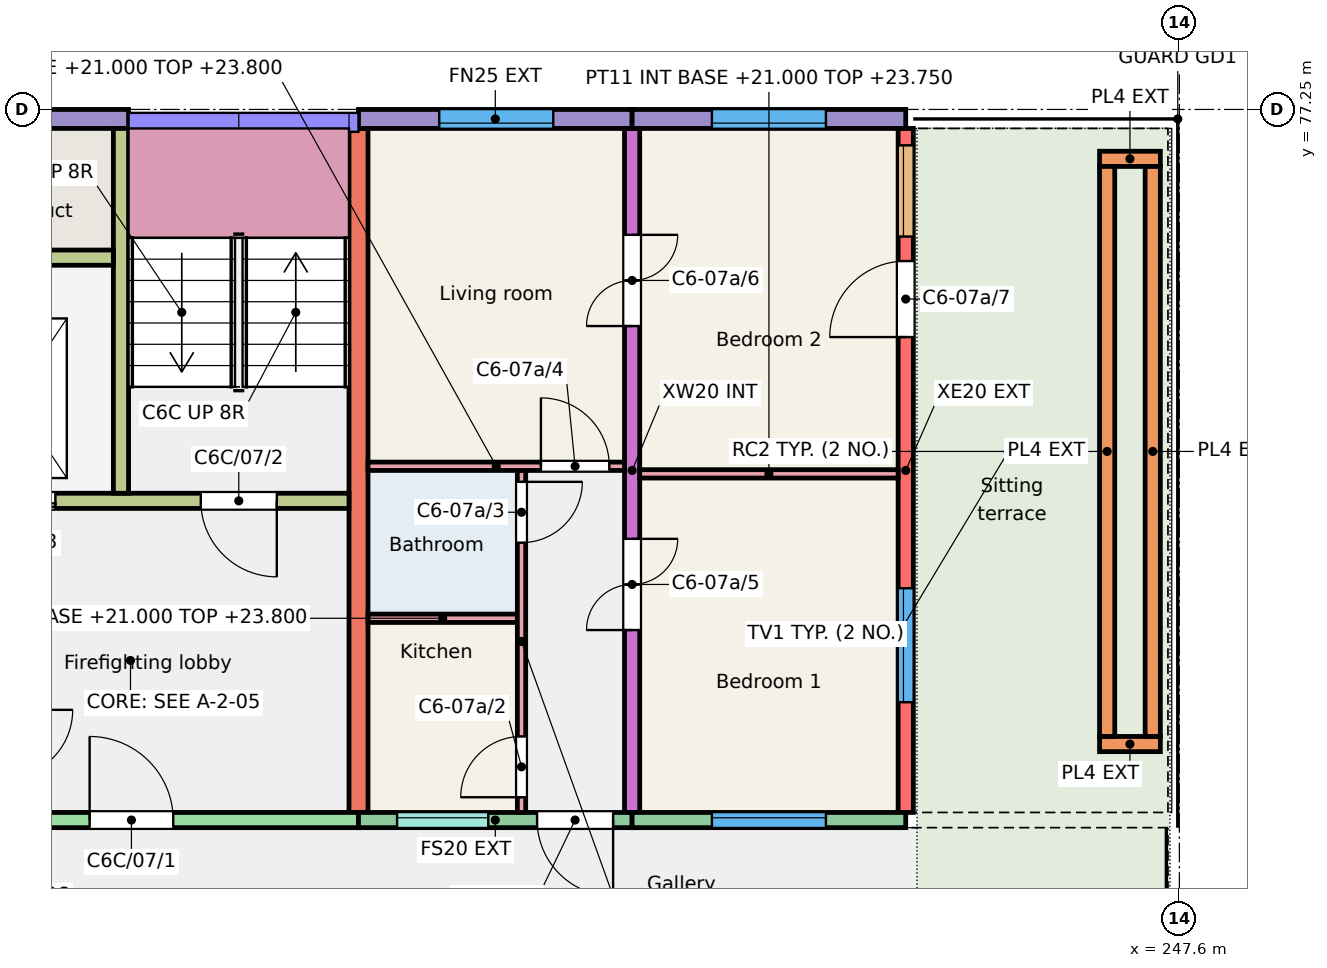
"""IFC4 building model, lengths in metres.
Left out: names, types, materials, properties, quantities, classifications, styles, units other than length and angle.
Written with IfcOpenShell. Run it as: python <this file> out.ifc"""

import sys

from ifc_helpers import new_model, si_unit, direction, frame, frame_2d, origin, place, context, subcontext, project, spatial, rectangle, extrude, element, fill, save


model = new_model("IFC4")
c1 = context("Model", 3, precision=1e-05, world=origin(), true_north=direction((0.0, 1.0)))
c2 = subcontext(c1, "Body", "Model", "MODEL_VIEW")
j1 = project(units=[si_unit("LENGTHUNIT", "METRE"), si_unit("PLANEANGLEUNIT", "RADIAN")], contexts=[c1])
p1 = place(None, origin())
s1 = spatial("IfcSite", under=j1, at=p1, CompositionType="ELEMENT")
p2 = place(p1, origin())
s2 = spatial("IfcBuilding", under=s1, at=p2, CompositionType="ELEMENT")
p3 = place(p2, frame((0.0, 0.0, 21.0)))
s3 = spatial("IfcBuildingStorey", under=s2, at=p3, CompositionType="ELEMENT", Elevation=21.0)
p4 = place(p3, frame((236.8, 68.0, 0.0), z_axis=(0.0, 0.0, 1.0), x_axis=(0.0, 1.0, 0.0)))
e1 = element("IfcWall", 1, at=p4, inside=s3, PredefinedType="SHEAR", context=c2, shape_type="SweptSolid", body=[
    extrude(rectangle(XDim=9.0, YDim=0.25, at=frame_2d((4.5, 0.0))), origin(), (0.0, 0.0, 1.0), 3.0),
])
p5 = place(p3, frame((240.4, 68.0, 0.0), z_axis=(0.0, 0.0, 1.0), x_axis=(0.0, 1.0, 0.0)))
e2 = element("IfcWall", 2, at=p5, inside=s3, PredefinedType="SHEAR", context=c2, shape_type="SweptSolid", body=[
    extrude(rectangle(XDim=9.0, YDim=0.2, at=frame_2d((4.5, 0.0))), origin(), (0.0, 0.0, 1.0), 3.0),
])
p6 = place(p5, frame((2.4, 0.0, 0.0)))
e3 = element("IfcOpeningElement", 3, at=p6, cuts=e2, PredefinedType="OPENING", context=c2, shape_type="SweptSolid", body=[
    extrude(rectangle(XDim=1.2, YDim=2.1, at=frame_2d((0.6, 1.05))), frame((0.0, 0.11, 0.0), z_axis=(0.0, -1.0, 0.0), x_axis=(1.0, 0.0, 0.0)), (0.0, 0.0, 1.0), 0.22),
])
p7 = place(p5, frame((6.4, 0.0, 0.0)))
e4 = element("IfcOpeningElement", 4, at=p7, cuts=e2, PredefinedType="OPENING", context=c2, shape_type="SweptSolid", body=[
    extrude(rectangle(XDim=1.2, YDim=2.1, at=frame_2d((0.6, 1.05))), frame((0.0, 0.11, 0.0), z_axis=(0.0, -1.0, 0.0), x_axis=(1.0, 0.0, 0.0)), (0.0, 0.0, 1.0), 0.22),
])
p8 = place(p3, frame((244.0, 68.0, 0.0), z_axis=(0.0, 0.0, 1.0), x_axis=(0.0, 1.0, 0.0)))
e5 = element("IfcWall", 5, at=p8, inside=s3, PredefinedType="SHEAR", context=c2, shape_type="SweptSolid", body=[
    extrude(rectangle(XDim=9.0, YDim=0.2, at=frame_2d((4.5, 0.0))), origin(), (0.0, 0.0, 1.0), 3.0),
])
p9 = place(p8, frame((1.45, 0.0, 0.9)))
e6 = element("IfcOpeningElement", 6, at=p9, cuts=e5, PredefinedType="OPENING", context=c2, shape_type="SweptSolid", body=[
    extrude(rectangle(XDim=1.5, YDim=1.5, at=frame_2d((0.75, 0.75))), frame((0.0, 0.11, 0.0), z_axis=(0.0, -1.0, 0.0), x_axis=(1.0, 0.0, 0.0)), (0.0, 0.0, 1.0), 0.22),
])
p10 = place(p8, frame((7.577, 0.0, 0.9)))
e7 = element("IfcOpeningElement", 7, at=p10, cuts=e5, PredefinedType="OPENING", context=c2, shape_type="SweptSolid", body=[
    extrude(rectangle(XDim=1.2, YDim=1.5, at=frame_2d((0.6, 0.75))), frame((0.0, 0.11, 0.0), z_axis=(0.0, -1.0, 0.0), x_axis=(1.0, 0.0, 0.0)), (0.0, 0.0, 1.0), 0.22),
])
p11 = place(p8, frame((6.255, 0.0, 0.0)))
e8 = element("IfcOpeningElement", 8, at=p11, cuts=e5, PredefinedType="OPENING", context=c2, shape_type="SweptSolid", body=[
    extrude(rectangle(XDim=1.0, YDim=2.1, at=frame_2d((0.5, 1.05))), frame((0.0, 0.11, 0.0), z_axis=(0.0, -1.0, 0.0), x_axis=(1.0, 0.0, 0.0)), (0.0, 0.0, 1.0), 0.22),
])
p12 = place(p3, frame((230.8, 77.125, 0.0), z_axis=(0.0, 0.0, 1.0), x_axis=(1.0, 0.0, 0.0)))
e9 = element("IfcWall", 9, at=p12, inside=s3, PredefinedType="SOLIDWALL", context=c2, shape_type="SweptSolid", body=[
    extrude(rectangle(XDim=2.975, YDim=0.25, at=frame_2d((1.487, 0.0))), origin(), (0.0, 0.0, 1.0), 3.0),
])
p13 = place(p3, frame((230.95, 67.9, 0.0), z_axis=(0.0, 0.0, 1.0), x_axis=(1.0, 0.0, 0.0)))
e10 = element("IfcWall", 10, at=p13, inside=s3, PredefinedType="SHEAR", context=c2, shape_type="SweptSolid", body=[
    extrude(rectangle(XDim=5.85, YDim=0.2, at=frame_2d((2.925, 0.0))), origin(), (0.0, 0.0, 1.0), 3.0),
])
p14 = place(p13, frame((2.312, 0.0, 0.0)))
e11 = element("IfcOpeningElement", 11, at=p14, cuts=e10, PredefinedType="OPENING", context=c2, shape_type="SweptSolid", body=[
    extrude(rectangle(XDim=1.1, YDim=2.1, at=frame_2d((0.55, 1.05))), frame((0.0, 0.11, 0.0), z_axis=(0.0, -1.0, 0.0), x_axis=(1.0, 0.0, 0.0)), (0.0, 0.0, 1.0), 0.22),
])
p15 = place(p3, frame((230.95, 72.1, 0.0), z_axis=(0.0, 0.0, 1.0), x_axis=(1.0, 0.0, 0.0)))
e12 = element("IfcWall", 12, at=p15, inside=s3, PredefinedType="SHEAR", context=c2, shape_type="SweptSolid", body=[
    extrude(rectangle(XDim=5.725, YDim=0.2, at=frame_2d((2.863, 0.0))), origin(), (0.0, 0.0, 1.0), 3.0),
])
p16 = place(p15, frame((3.775, 0.0, 0.0)))
e13 = element("IfcOpeningElement", 13, at=p16, cuts=e12, PredefinedType="OPENING", context=c2, shape_type="SweptSolid", body=[
    extrude(rectangle(XDim=1.0, YDim=2.1, at=frame_2d((0.5, 1.05))), frame((0.0, 0.11, 0.0), z_axis=(0.0, -1.0, 0.0), x_axis=(1.0, 0.0, 0.0)), (0.0, 0.0, 1.0), 0.22),
])
p17 = place(p15, frame((0.762, 0.0, 0.0)))
e14 = element("IfcOpeningElement", 14, at=p17, cuts=e12, PredefinedType="OPENING", context=c2, shape_type="SweptSolid", body=[
    extrude(rectangle(XDim=1.1, YDim=2.1, at=frame_2d((0.55, 1.05))), frame((0.0, 0.11, 0.0), z_axis=(0.0, -1.0, 0.0), x_axis=(1.0, 0.0, 0.0)), (0.0, 0.0, 1.0), 0.22),
])
p18 = place(p3, frame((233.675, 72.2, 0.0), z_axis=(0.0, 0.0, 1.0), x_axis=(0.0, 1.0, 0.0)))
e15 = element("IfcWall", 15, at=p18, inside=s3, PredefinedType="SHEAR", context=c2, shape_type="SweptSolid", body=[
    extrude(rectangle(XDim=4.8, YDim=0.2, at=frame_2d((2.4, 0.0))), origin(), (0.0, 0.0, 1.0), 3.0),
])
p19 = place(p3, frame((230.95, 75.3, 0.0), z_axis=(0.0, 0.0, 1.0), x_axis=(1.0, 0.0, 0.0)))
e16 = element("IfcWall", 16, at=p19, inside=s3, PredefinedType="SHEAR", context=c2, shape_type="SweptSolid", body=[
    extrude(rectangle(XDim=2.625, YDim=0.2, at=frame_2d((1.312, 0.0))), origin(), (0.0, 0.0, 1.0), 3.0),
])
p20 = place(p3, frame((236.8, 77.125, 0.0), z_axis=(0.0, 0.0, 1.0), x_axis=(1.0, 0.0, 0.0)))
e17 = element("IfcWall", 17, at=p20, inside=s3, PredefinedType="SOLIDWALL", context=c2, shape_type="SweptSolid", body=[
    extrude(rectangle(XDim=3.6, YDim=0.25, at=frame_2d((1.8, 0.0))), origin(), (0.0, 0.0, 1.0), 3.0),
])
p21 = place(p20, frame((1.062, 0.0, 0.9)))
e18 = element("IfcOpeningElement", 18, at=p21, cuts=e17, PredefinedType="OPENING", context=c2, shape_type="SweptSolid", body=[
    extrude(rectangle(XDim=1.5, YDim=1.5, at=frame_2d((0.75, 0.75))), frame((0.0, 0.135, 0.0), z_axis=(0.0, -1.0, 0.0), x_axis=(1.0, 0.0, 0.0)), (0.0, 0.0, 1.0), 0.27),
])
p22 = place(p3, frame((236.8, 67.9, 0.0), z_axis=(0.0, 0.0, 1.0), x_axis=(1.0, 0.0, 0.0)))
e19 = element("IfcWall", 19, at=p22, inside=s3, PredefinedType="SOLIDWALL", context=c2, shape_type="SweptSolid", body=[
    extrude(rectangle(XDim=3.6, YDim=0.2, at=frame_2d((1.8, 0.0))), origin(), (0.0, 0.0, 1.0), 3.0),
])
p23 = place(p22, frame((0.508, 0.0, 1.1)))
e20 = element("IfcOpeningElement", 20, at=p23, cuts=e19, PredefinedType="OPENING", context=c2, shape_type="SweptSolid", body=[
    extrude(rectangle(XDim=1.2, YDim=1.3, at=frame_2d((0.6, 0.65))), frame((0.0, 0.11, 0.0), z_axis=(0.0, -1.0, 0.0), x_axis=(1.0, 0.0, 0.0)), (0.0, 0.0, 1.0), 0.22),
])
p24 = place(p22, frame((2.35, 0.0, 0.0)))
e21 = element("IfcOpeningElement", 21, at=p24, cuts=e19, PredefinedType="OPENING", context=c2, shape_type="SweptSolid", body=[
    extrude(rectangle(XDim=1.0, YDim=2.1, at=frame_2d((0.5, 1.05))), frame((0.0, 0.11, 0.0), z_axis=(0.0, -1.0, 0.0), x_axis=(1.0, 0.0, 0.0)), (0.0, 0.0, 1.0), 0.22),
])
p25 = place(p3, frame((240.4, 77.125, 0.0), z_axis=(0.0, 0.0, 1.0), x_axis=(1.0, 0.0, 0.0)))
e22 = element("IfcWall", 22, at=p25, inside=s3, PredefinedType="SOLIDWALL", context=c2, shape_type="SweptSolid", body=[
    extrude(rectangle(XDim=3.6, YDim=0.25, at=frame_2d((1.8, 0.0))), origin(), (0.0, 0.0, 1.0), 3.0),
])
p26 = place(p25, frame((1.05, 0.0, 0.9)))
e23 = element("IfcOpeningElement", 23, at=p26, cuts=e22, PredefinedType="OPENING", context=c2, shape_type="SweptSolid", body=[
    extrude(rectangle(XDim=1.5, YDim=1.5, at=frame_2d((0.75, 0.75))), frame((0.0, 0.135, 0.0), z_axis=(0.0, -1.0, 0.0), x_axis=(1.0, 0.0, 0.0)), (0.0, 0.0, 1.0), 0.27),
])
p27 = place(p3, frame((240.4, 67.9, 0.0), z_axis=(0.0, 0.0, 1.0), x_axis=(1.0, 0.0, 0.0)))
e24 = element("IfcWall", 24, at=p27, inside=s3, PredefinedType="SOLIDWALL", context=c2, shape_type="SweptSolid", body=[
    extrude(rectangle(XDim=3.6, YDim=0.2, at=frame_2d((1.8, 0.0))), origin(), (0.0, 0.0, 1.0), 3.0),
])
p28 = place(p27, frame((1.05, 0.0, 0.9)))
e25 = element("IfcOpeningElement", 25, at=p28, cuts=e24, PredefinedType="OPENING", context=c2, shape_type="SweptSolid", body=[
    extrude(rectangle(XDim=1.5, YDim=1.5, at=frame_2d((0.75, 0.75))), frame((0.0, 0.11, 0.0), z_axis=(0.0, -1.0, 0.0), x_axis=(1.0, 0.0, 0.0)), (0.0, 0.0, 1.0), 0.22),
])
for number, where, z_axis, x_axis in (
    (26, (246.55, 68.9, 0.01), (0.0, 0.0, 1.0), (1.0, 0.0, 0.0)),
    (27, (246.55, 76.6, 0.01), (0.0, 0.0, 1.0), (1.0, 0.0, 0.0)),
):
    element("IfcWall", number, at=place(p3, frame(where, z_axis=z_axis, x_axis=x_axis)), inside=s3, PredefinedType="SOLIDWALL", context=c2, shape_type="SweptSolid", body=[
        extrude(rectangle(XDim=0.8, YDim=0.2, at=frame_2d((0.4, 0.0))), origin(), (0.0, 0.0, 1.0), 0.45),
    ])
for number, where, z_axis, x_axis in (
    (28, (246.65, 69.0, 0.01), (0.0, 0.0, 1.0), (0.0, 1.0, 0.0)),
    (29, (247.25, 69.0, 0.01), (0.0, 0.0, 1.0), (0.0, 1.0, 0.0)),
):
    element("IfcWall", number, at=place(p3, frame(where, z_axis=z_axis, x_axis=x_axis)), inside=s3, PredefinedType="SOLIDWALL", context=c2, shape_type="SweptSolid", body=[
        extrude(rectangle(XDim=7.5, YDim=0.2, at=frame_2d((3.75, 0.0))), origin(), (0.0, 0.0, 1.0), 0.45),
    ])
p29 = place(p3, frame((236.925, 70.555, 0.0), z_axis=(0.0, 0.0, 1.0), x_axis=(1.0, 0.0, 0.0)))
e30 = element("IfcWall", 30, at=p29, inside=s3, PredefinedType="PARTITIONING", context=c2, shape_type="SweptSolid", body=[
    extrude(rectangle(XDim=1.965, YDim=0.11, at=frame_2d((0.982, 0.0))), origin(), (0.0, 0.0, 1.0), 2.8),
])
p30 = place(p3, frame((238.945, 68.0, 0.0), z_axis=(0.0, 0.0, 1.0), x_axis=(0.0, 1.0, 0.0)))
e31 = element("IfcWall", 31, at=p30, inside=s3, PredefinedType="PARTITIONING", context=c2, shape_type="SweptSolid", body=[
    extrude(rectangle(XDim=4.5, YDim=0.11, at=frame_2d((2.25, 0.0))), origin(), (0.0, 0.0, 1.0), 2.8),
])
p31 = place(p30, frame((0.2, 0.0, 0.0)))
e32 = element("IfcOpeningElement", 32, at=p31, cuts=e31, PredefinedType="OPENING", context=c2, shape_type="SweptSolid", body=[
    extrude(rectangle(XDim=0.8, YDim=2.1, at=frame_2d((0.4, 1.05))), frame((0.0, 0.065, 0.0), z_axis=(0.0, -1.0, 0.0), x_axis=(1.0, 0.0, 0.0)), (0.0, 0.0, 1.0), 0.13),
])
p32 = place(p30, frame((3.55, 0.0, 0.0)))
e33 = element("IfcOpeningElement", 33, at=p32, cuts=e31, PredefinedType="OPENING", context=c2, shape_type="SweptSolid", body=[
    extrude(rectangle(XDim=0.8, YDim=2.1, at=frame_2d((0.4, 1.05))), frame((0.0, 0.065, 0.0), z_axis=(0.0, -1.0, 0.0), x_axis=(1.0, 0.0, 0.0)), (0.0, 0.0, 1.0), 0.13),
])
p33 = place(p3, frame((236.925, 72.555, 0.0), z_axis=(0.0, 0.0, 1.0), x_axis=(1.0, 0.0, 0.0)))
e34 = element("IfcWall", 34, at=p33, inside=s3, PredefinedType="PARTITIONING", context=c2, shape_type="SweptSolid", body=[
    extrude(rectangle(XDim=3.375, YDim=0.11, at=frame_2d((1.688, 0.0))), origin(), (0.0, 0.0, 1.0), 2.8),
])
p34 = place(p33, frame((2.275, 0.0, 0.0)))
e35 = element("IfcOpeningElement", 35, at=p34, cuts=e34, PredefinedType="OPENING", context=c2, shape_type="SweptSolid", body=[
    extrude(rectangle(XDim=0.9, YDim=2.1, at=frame_2d((0.45, 1.05))), frame((0.0, 0.065, 0.0), z_axis=(0.0, -1.0, 0.0), x_axis=(1.0, 0.0, 0.0)), (0.0, 0.0, 1.0), 0.13),
])
p35 = place(p3, frame((240.5, 72.455, 0.0), z_axis=(0.0, 0.0, 1.0), x_axis=(1.0, 0.0, 0.0)))
e36 = element("IfcWall", 36, at=p35, inside=s3, PredefinedType="PARTITIONING", context=c2, shape_type="SweptSolid", body=[
    extrude(rectangle(XDim=3.4, YDim=0.11, at=frame_2d((1.7, 0.0))), origin(), (0.0, 0.0, 1.0), 2.75),
])
p36 = place(p28, origin())
e37 = element("IfcWindow", 37, at=p36, inside=s3, PartitioningType="SINGLE_PANEL", PredefinedType="WINDOW", context=c2, shape_type="SweptSolid", body=[
    extrude(rectangle(XDim=1.5, YDim=1.5, at=frame_2d((0.75, 0.75))), frame((0.0, 0.06, 0.0), z_axis=(0.0, -1.0, 0.0), x_axis=(1.0, 0.0, 0.0)), (0.0, 0.0, 1.0), 0.06),
])
fill(e25, e37)
p37 = place(p26, origin())
e38 = element("IfcWindow", 38, at=p37, inside=s3, PartitioningType="SINGLE_PANEL", PredefinedType="WINDOW", context=c2, shape_type="SweptSolid", body=[
    extrude(rectangle(XDim=1.5, YDim=1.5, at=frame_2d((0.75, 0.75))), frame((0.0, -0.025, 0.0), z_axis=(0.0, -1.0, 0.0), x_axis=(1.0, 0.0, 0.0)), (0.0, 0.0, 1.0), 0.06),
])
fill(e23, e38)
p38 = place(p23, origin())
e39 = element("IfcWindow", 39, at=p38, inside=s3, PartitioningType="SINGLE_PANEL", PredefinedType="WINDOW", context=c2, shape_type="SweptSolid", body=[
    extrude(rectangle(XDim=1.2, YDim=1.3, at=frame_2d((0.6, 0.65))), frame((0.0, 0.06, 0.0), z_axis=(0.0, -1.0, 0.0), x_axis=(1.0, 0.0, 0.0)), (0.0, 0.0, 1.0), 0.06),
])
fill(e20, e39)
p39 = place(p21, origin())
e40 = element("IfcWindow", 40, at=p39, inside=s3, PartitioningType="SINGLE_PANEL", PredefinedType="WINDOW", context=c2, shape_type="SweptSolid", body=[
    extrude(rectangle(XDim=1.5, YDim=1.5, at=frame_2d((0.75, 0.75))), frame((0.0, -0.025, 0.0), z_axis=(0.0, -1.0, 0.0), x_axis=(1.0, 0.0, 0.0)), (0.0, 0.0, 1.0), 0.06),
])
fill(e18, e40)
p40 = place(p9, origin())
e41 = element("IfcWindow", 41, at=p40, inside=s3, PartitioningType="SINGLE_PANEL", PredefinedType="WINDOW", context=c2, shape_type="SweptSolid", body=[
    extrude(rectangle(XDim=1.5, YDim=1.5, at=frame_2d((0.75, 0.75))), frame((0.0, 0.06, 0.0), z_axis=(0.0, -1.0, 0.0), x_axis=(1.0, 0.0, 0.0)), (0.0, 0.0, 1.0), 0.06),
])
fill(e6, e41)
p41 = place(p10, origin())
e42 = element("IfcWindow", 42, at=p41, inside=s3, PartitioningType="SINGLE_PANEL", PredefinedType="WINDOW", context=c2, shape_type="SweptSolid", body=[
    extrude(rectangle(XDim=1.2, YDim=1.5, at=frame_2d((0.6, 0.75))), frame((0.0, 0.06, 0.0), z_axis=(0.0, -1.0, 0.0), x_axis=(1.0, 0.0, 0.0)), (0.0, 0.0, 1.0), 0.06),
])
fill(e7, e42)
p42 = place(p24, origin())
e43 = element("IfcDoor", 43, at=p42, inside=s3, OperationType="SINGLE_SWING_RIGHT", PredefinedType="DOOR", context=c2, shape_type="SweptSolid", body=[
    extrude(rectangle(XDim=1.0, YDim=2.1, at=frame_2d((0.5, 1.05))), frame((0.0, 0.025, 0.0), z_axis=(0.0, -1.0, 0.0), x_axis=(1.0, 0.0, 0.0)), (0.0, 0.0, 1.0), 0.05),
])
fill(e21, e43)
p43 = place(p31, origin())
e44 = element("IfcDoor", 44, at=p43, inside=s3, OperationType="SINGLE_SWING_LEFT", PredefinedType="DOOR", context=c2, shape_type="SweptSolid", body=[
    extrude(rectangle(XDim=0.8, YDim=2.1, at=frame_2d((0.4, 1.05))), frame((0.0, 0.025, 0.0), z_axis=(0.0, -1.0, 0.0), x_axis=(1.0, 0.0, 0.0)), (0.0, 0.0, 1.0), 0.05),
])
fill(e32, e44)
p44 = place(p32, origin())
e45 = element("IfcDoor", 45, at=p44, inside=s3, OperationType="SINGLE_SWING_RIGHT", PredefinedType="DOOR", context=c2, shape_type="SweptSolid", body=[
    extrude(rectangle(XDim=0.8, YDim=2.1, at=frame_2d((0.4, 1.05))), frame((0.0, 0.025, 0.0), z_axis=(0.0, -1.0, 0.0), x_axis=(1.0, 0.0, 0.0)), (0.0, 0.0, 1.0), 0.05),
])
fill(e33, e45)
p45 = place(p34, origin())
e46 = element("IfcDoor", 46, at=p45, inside=s3, OperationType="SINGLE_SWING_LEFT", PredefinedType="DOOR", context=c2, shape_type="SweptSolid", body=[
    extrude(rectangle(XDim=0.9, YDim=2.1, at=frame_2d((0.45, 1.05))), frame((0.0, 0.025, 0.0), z_axis=(0.0, -1.0, 0.0), x_axis=(1.0, 0.0, 0.0)), (0.0, 0.0, 1.0), 0.05),
])
fill(e35, e46)
p46 = place(p6, origin())
e47 = element("IfcDoor", 47, at=p46, inside=s3, OperationType="DOUBLE_DOOR_SINGLE_SWING", PredefinedType="DOOR", context=c2, shape_type="SweptSolid", body=[
    extrude(rectangle(XDim=1.2, YDim=2.1, at=frame_2d((0.6, 1.05))), frame((0.0, 0.025, 0.0), z_axis=(0.0, -1.0, 0.0), x_axis=(1.0, 0.0, 0.0)), (0.0, 0.0, 1.0), 0.05),
])
fill(e3, e47)
p47 = place(p7, origin())
e48 = element("IfcDoor", 48, at=p47, inside=s3, OperationType="DOUBLE_DOOR_SINGLE_SWING", PredefinedType="DOOR", context=c2, shape_type="SweptSolid", body=[
    extrude(rectangle(XDim=1.2, YDim=2.1, at=frame_2d((0.6, 1.05))), frame((0.0, 0.025, 0.0), z_axis=(0.0, -1.0, 0.0), x_axis=(1.0, 0.0, 0.0)), (0.0, 0.0, 1.0), 0.05),
])
fill(e4, e48)
p48 = place(p11, origin())
e49 = element("IfcDoor", 49, at=p48, inside=s3, OperationType="SINGLE_SWING_LEFT", PredefinedType="DOOR", context=c2, shape_type="SweptSolid", body=[
    extrude(rectangle(XDim=1.0, YDim=2.1, at=frame_2d((0.5, 1.05))), frame((0.0, 0.025, 0.0), z_axis=(0.0, -1.0, 0.0), x_axis=(1.0, 0.0, 0.0)), (0.0, 0.0, 1.0), 0.05),
])
fill(e8, e49)
p49 = place(p14, origin())
e50 = element("IfcDoor", 50, at=p49, inside=s3, OperationType="SINGLE_SWING_LEFT", PredefinedType="DOOR", context=c2, shape_type="SweptSolid", body=[
    extrude(rectangle(XDim=1.1, YDim=2.1, at=frame_2d((0.55, 1.05))), frame((0.0, 0.025, 0.0), z_axis=(0.0, -1.0, 0.0), x_axis=(1.0, 0.0, 0.0)), (0.0, 0.0, 1.0), 0.05),
])
fill(e11, e50)
p50 = place(p16, origin())
e51 = element("IfcDoor", 51, at=p50, inside=s3, OperationType="SINGLE_SWING_RIGHT", PredefinedType="DOOR", context=c2, shape_type="SweptSolid", body=[
    extrude(rectangle(XDim=1.0, YDim=2.1, at=frame_2d((0.5, 1.05))), frame((0.0, 0.025, 0.0), z_axis=(0.0, -1.0, 0.0), x_axis=(1.0, 0.0, 0.0)), (0.0, 0.0, 1.0), 0.05),
])
fill(e13, e51)
p51 = place(p17, origin())
e52 = element("IfcDoor", 52, at=p51, inside=s3, OperationType="DOUBLE_DOOR_SLIDING", PredefinedType="DOOR", context=c2, shape_type="SweptSolid", body=[
    extrude(rectangle(XDim=1.1, YDim=2.1, at=frame_2d((0.55, 1.05))), frame((0.0, 0.025, 0.0), z_axis=(0.0, -1.0, 0.0), x_axis=(1.0, 0.0, 0.0)), (0.0, 0.0, 1.0), 0.05),
])
fill(e14, e52)
save(model, sys.argv[1])
